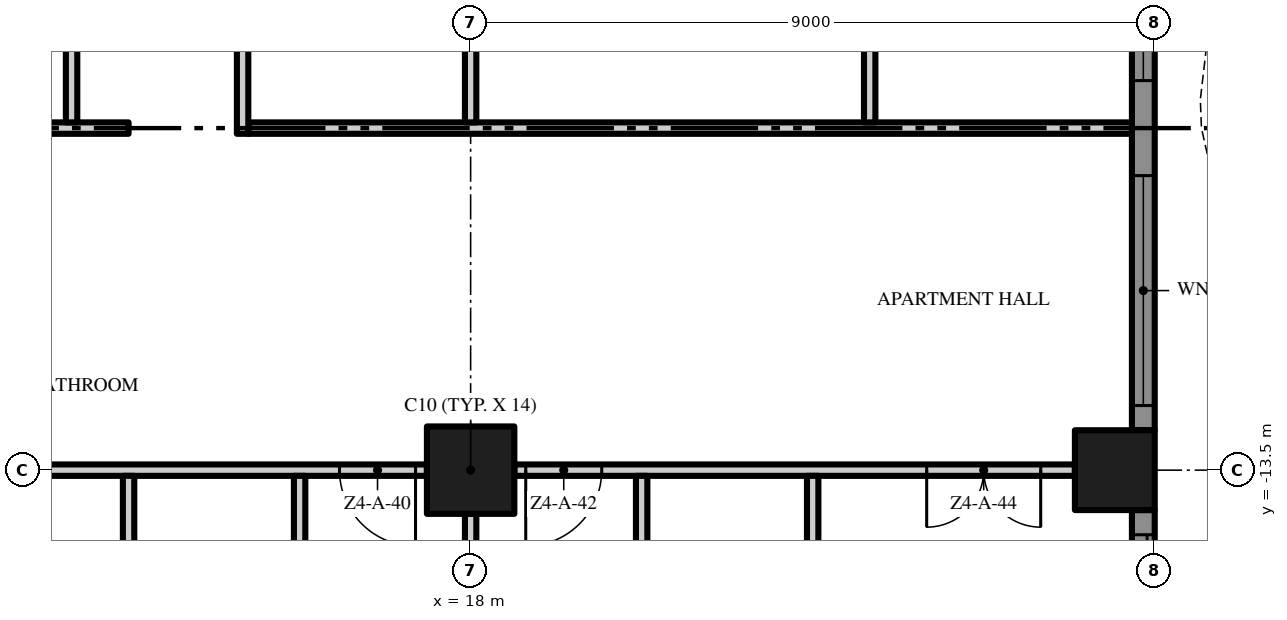
"""IFC4 building model, lengths in metres.
Left out: names, types, materials, properties, quantities, classifications, styles, units other than length and angle.
Written with IfcOpenShell. Run it as: python <this file> out.ifc"""

import sys

from ifc_helpers import new_model, si_unit, direction, frame, frame_2d, origin, origin_2d, place, context, subcontext, project, spatial, polyline, rectangle, outline, extrude, element, fill, save


model = new_model("IFC4")
c1 = context("Model", 3, precision=1e-05, world=origin(), true_north=direction((0.0, 1.0)))
c2 = subcontext(c1, "Body", "Model", "MODEL_VIEW")
j1 = project(units=[si_unit("LENGTHUNIT", "METRE"), si_unit("PLANEANGLEUNIT", "RADIAN")], contexts=[c1])
p1 = place(None, origin())
s1 = spatial("IfcSite", under=j1, at=p1, CompositionType="ELEMENT")
p2 = place(p1, origin())
s2 = spatial("IfcBuilding", under=s1, at=p2, CompositionType="ELEMENT")
p3 = place(p2, frame((0.0, 0.0, 184.4)))
s3 = spatial("IfcBuildingStorey", under=s2, at=p3, CompositionType="ELEMENT", Elevation=184.4)
p4 = place(p3, frame((18.0, -13.5, 0.0), z_axis=(0.0, 0.0, 1.0), x_axis=(1.0, 0.0, 0.0)))
e1 = element("IfcColumn", 1, at=p4, inside=s3, PredefinedType="COLUMN", context=c2, shape_type="SweptSolid", body=[
    extrude(rectangle(XDim=1.15, YDim=1.15, at=origin_2d()), origin(), (0.0, 0.0, 1.0), 3.5),
])
p5 = place(p3, frame((26.475, -13.5, 0.0), z_axis=(0.0, 0.0, 1.0), x_axis=(1.0, 0.0, 0.0)))
e2 = element("IfcColumn", 2, at=p5, inside=s3, PredefinedType="COLUMN", context=c2, shape_type="SweptSolid", body=[
    extrude(rectangle(XDim=1.05, YDim=1.05, at=origin_2d()), origin(), (0.0, 0.0, 1.0), 3.5),
])
p6 = place(p3, frame((26.85, -14.025, 0.0), z_axis=(0.0, 0.0, 1.0), x_axis=(0.0, -1.0, 0.0)))
e3 = element("IfcWall", 3, at=p6, inside=s3, PredefinedType="SOLIDWALL", context=c2, shape_type="SweptSolid", body=[
    extrude(rectangle(XDim=3.675, YDim=0.3, at=frame_2d((1.837, 0.0))), origin(), (0.0, 0.0, 1.0), 3.5),
])
p7 = place(p6, frame((0.325, 0.0, 0.0)))
e4 = element("IfcOpeningElement", 4, at=p7, cuts=e3, PredefinedType="OPENING", context=c2, shape_type="SweptSolid", body=[
    extrude(rectangle(XDim=3.025, YDim=2.4, at=frame_2d((1.512, 1.2))), frame((0.0, 0.16, 0.0), z_axis=(0.0, -1.0, 0.0), x_axis=(1.0, 0.0, 0.0)), (0.0, 0.0, 1.0), 0.32),
])
p8 = place(p3, frame((26.85, -5.025, 0.0), z_axis=(0.0, 0.0, 1.0), x_axis=(0.0, -1.0, 0.0)))
e5 = element("IfcWall", 5, at=p8, inside=s3, PredefinedType="SOLIDWALL", context=c2, shape_type="SweptSolid", body=[
    extrude(rectangle(XDim=7.95, YDim=0.3, at=frame_2d((3.975, 0.0))), origin(), (0.0, 0.0, 1.0), 3.5),
])
p9 = place(p8, frame((4.6, 0.0, 0.45)))
e6 = element("IfcOpeningElement", 6, at=p9, cuts=e5, PredefinedType="OPENING", context=c2, shape_type="SweptSolid", body=[
    extrude(rectangle(XDim=3.025, YDim=2.65, at=frame_2d((1.512, 1.325))), frame((0.0, 0.16, 0.0), z_axis=(0.0, -1.0, 0.0), x_axis=(1.0, 0.0, 0.0)), (0.0, 0.0, 1.0), 0.32),
])
p10 = place(p8, frame((0.325, 0.0, 0.45)))
e7 = element("IfcOpeningElement", 7, at=p10, cuts=e5, PredefinedType="OPENING", context=c2, shape_type="SweptSolid", body=[
    extrude(rectangle(XDim=3.025, YDim=2.65, at=frame_2d((1.512, 1.325))), frame((0.0, 0.16, 0.0), z_axis=(0.0, -1.0, 0.0), x_axis=(1.0, 0.0, 0.0)), (0.0, 0.0, 1.0), 0.32),
])
p11 = place(p3, origin())
e8 = element("IfcWall", 8, at=p11, inside=s3, PredefinedType="USERDEFINED", context=c2, shape_type="SweptSolid", body=[
    extrude(outline(polyline([(29.649, -18.0), (29.985, -16.5), (30.0, -16.125), (29.869, -15.0), (29.345, -13.5), (28.612, -12.0), (27.951, -10.5), (27.615, -9.0), (27.6, -8.625), (27.731, -7.5), (28.255, -6.0), (28.988, -4.5), (29.649, -3.0), (29.985, -1.5), (30.0, -1.125), (29.869, 0.0), (29.345, 1.5), (28.612, 3.0), (27.951, 4.5), (27.615, 6.0), (27.6, 6.375), (27.731, 7.5), (28.255, 9.0), (28.988, 10.5), (29.649, 12.0), (29.985, 13.5), (30.0, 13.875), (29.869, 15.0), (29.345, 16.5), (28.612, 18.0), (28.388, 17.89), (29.114, 16.404), (29.624, 14.944), (29.749, 13.865), (29.736, 13.533), (29.41, 12.079), (28.761, 10.605), (28.024, 9.096), (27.486, 7.556), (27.349, 6.385), (27.366, 5.967), (27.713, 4.421), (28.385, 2.895), (29.114, 1.404), (29.624, -0.056), (29.749, -1.135), (29.736, -1.467), (29.41, -2.921), (28.761, -4.395), (28.024, -5.904), (27.486, -7.444), (27.349, -8.615), (27.366, -9.033), (27.713, -10.579), (28.385, -12.105), (29.114, -13.596), (29.624, -15.056), (29.749, -16.135), (29.736, -16.467), (29.405, -17.945), (29.649, -18.0)])), origin(), (0.0, 0.0, 1.0), 0.9),
])
p12 = place(p3, frame((17.425, -13.5, 0.0), z_axis=(0.0, 0.0, 1.0), x_axis=(-1.0, 0.0, 0.0)))
e9 = element("IfcWall", 9, at=p12, inside=s3, PredefinedType="PARTITIONING", context=c2, shape_type="SweptSolid", body=[
    extrude(rectangle(XDim=7.85, YDim=0.15, at=frame_2d((3.925, 0.0))), origin(), (0.0, 0.0, 1.0), 3.5),
])
p13 = place(p12, frame((6.7, 0.0, 0.0)))
e10 = element("IfcOpeningElement", 10, at=p13, cuts=e9, PredefinedType="OPENING", context=c2, shape_type="SweptSolid", body=[
    extrude(rectangle(XDim=1.0, YDim=2.4, at=frame_2d((0.5, 1.2))), frame((0.0, 0.085, 0.0), z_axis=(0.0, -1.0, 0.0), x_axis=(1.0, 0.0, 0.0)), (0.0, 0.0, 1.0), 0.17),
])
p14 = place(p12, frame((0.15, 0.0, 0.0)))
e11 = element("IfcOpeningElement", 11, at=p14, cuts=e9, PredefinedType="OPENING", context=c2, shape_type="SweptSolid", body=[
    extrude(rectangle(XDim=1.0, YDim=2.4, at=frame_2d((0.5, 1.2))), frame((0.0, 0.085, 0.0), z_axis=(0.0, -1.0, 0.0), x_axis=(1.0, 0.0, 0.0)), (0.0, 0.0, 1.0), 0.17),
])
p15 = place(p3, frame((25.95, -13.5, 0.0), z_axis=(0.0, 0.0, 1.0), x_axis=(-1.0, 0.0, 0.0)))
e12 = element("IfcWall", 12, at=p15, inside=s3, PredefinedType="PARTITIONING", context=c2, shape_type="SweptSolid", body=[
    extrude(rectangle(XDim=7.375, YDim=0.15, at=frame_2d((3.688, 0.0))), origin(), (0.0, 0.0, 1.0), 3.5),
])
p16 = place(p15, frame((6.225, 0.0, 0.0)))
e13 = element("IfcOpeningElement", 13, at=p16, cuts=e12, PredefinedType="OPENING", context=c2, shape_type="SweptSolid", body=[
    extrude(rectangle(XDim=1.0, YDim=2.4, at=frame_2d((0.5, 1.2))), frame((0.0, 0.085, 0.0), z_axis=(0.0, -1.0, 0.0), x_axis=(1.0, 0.0, 0.0)), (0.0, 0.0, 1.0), 0.17),
])
p17 = place(p15, frame((0.45, 0.0, 0.0)))
e14 = element("IfcOpeningElement", 14, at=p17, cuts=e12, PredefinedType="OPENING", context=c2, shape_type="SweptSolid", body=[
    extrude(rectangle(XDim=1.5, YDim=2.4, at=frame_2d((0.75, 1.2))), frame((0.0, 0.085, 0.0), z_axis=(0.0, -1.0, 0.0), x_axis=(1.0, 0.0, 0.0)), (0.0, 0.0, 1.0), 0.17),
])
p18 = place(p3, frame((0.1, -9.0, 0.0), z_axis=(0.0, 0.0, 1.0), x_axis=(1.0, 0.0, 0.0)))
e15 = element("IfcWall", 15, at=p18, inside=s3, PredefinedType="PARTITIONING", context=c2, shape_type="SweptSolid", body=[
    extrude(rectangle(XDim=13.4, YDim=0.15, at=frame_2d((6.7, 0.0))), origin(), (0.0, 0.0, 1.0), 3.5),
])
p19 = place(p18, frame((6.9, 0.0, 0.0)))
e16 = element("IfcOpeningElement", 16, at=p19, cuts=e15, PredefinedType="OPENING", context=c2, shape_type="SweptSolid", body=[
    extrude(rectangle(XDim=1.0, YDim=2.4, at=frame_2d((0.5, 1.2))), frame((0.0, 0.085, 0.0), z_axis=(0.0, -1.0, 0.0), x_axis=(1.0, 0.0, 0.0)), (0.0, 0.0, 1.0), 0.17),
])
p20 = place(p3, frame((15.075, -9.0, 0.0), z_axis=(0.0, 0.0, 1.0), x_axis=(1.0, 0.0, 0.0)))
e17 = element("IfcWall", 17, at=p20, inside=s3, PredefinedType="PARTITIONING", context=c2, shape_type="SweptSolid", body=[
    extrude(rectangle(XDim=11.625, YDim=0.15, at=frame_2d((5.812, 0.0))), origin(), (0.0, 0.0, 1.0), 3.5),
])
p21 = place(p3, frame((12.75, -8.925, 0.0), z_axis=(0.0, 0.0, 1.0), x_axis=(0.0, 1.0, 0.0)))
e18 = element("IfcWall", 18, at=p21, inside=s3, PredefinedType="PARTITIONING", context=c2, shape_type="SweptSolid", body=[
    extrude(rectangle(XDim=4.5, YDim=0.15, at=frame_2d((2.25, 0.0))), origin(), (0.0, 0.0, 1.0), 3.5),
])
p22 = place(p21, frame((1.75, 0.0, 0.0)))
e19 = element("IfcOpeningElement", 19, at=p22, cuts=e18, PredefinedType="OPENING", context=c2, shape_type="SweptSolid", body=[
    extrude(rectangle(XDim=0.9, YDim=2.1, at=frame_2d((0.45, 1.05))), frame((0.0, 0.085, 0.0), z_axis=(0.0, -1.0, 0.0), x_axis=(1.0, 0.0, 0.0)), (0.0, 0.0, 1.0), 0.17),
])
p23 = place(p3, frame((13.5, -22.2, 0.0), z_axis=(0.0, 0.0, 1.0), x_axis=(0.0, 1.0, 0.0)))
e20 = element("IfcWall", 20, at=p23, inside=s3, PredefinedType="PARTITIONING", context=c2, shape_type="SweptSolid", body=[
    extrude(rectangle(XDim=8.625, YDim=0.15, at=frame_2d((4.312, 0.0))), origin(), (0.0, 0.0, 1.0), 3.5),
])
p24 = place(p3, frame((15.0, -9.075, 0.0), z_axis=(0.0, 0.0, 1.0), x_axis=(0.0, 1.0, 0.0)))
e21 = element("IfcWall", 21, at=p24, inside=s3, PredefinedType="PARTITIONING", context=c2, shape_type="SweptSolid", body=[
    extrude(rectangle(XDim=4.65, YDim=0.15, at=frame_2d((2.325, 0.0))), origin(), (0.0, 0.0, 1.0), 3.5),
])
p25 = place(p3, frame((15.75, -16.575, 0.0), z_axis=(0.0, 0.0, 1.0), x_axis=(0.0, 1.0, 0.0)))
e22 = element("IfcWall", 22, at=p25, inside=s3, PredefinedType="PARTITIONING", context=c2, shape_type="SweptSolid", body=[
    extrude(rectangle(XDim=3.0, YDim=0.15, at=frame_2d((1.5, 0.0))), origin(), (0.0, 0.0, 1.0), 3.5),
])
p26 = place(p3, frame((18.0, -21.45, 0.0), z_axis=(0.0, 0.0, 1.0), x_axis=(0.0, 1.0, 0.0)))
e23 = element("IfcWall", 23, at=p26, inside=s3, PredefinedType="PARTITIONING", context=c2, shape_type="SweptSolid", body=[
    extrude(rectangle(XDim=7.375, YDim=0.15, at=frame_2d((3.688, 0.0))), origin(), (0.0, 0.0, 1.0), 3.5),
])
p27 = place(p3, frame((18.0, -8.925, 0.0), z_axis=(0.0, 0.0, 1.0), x_axis=(0.0, 1.0, 0.0)))
e24 = element("IfcWall", 24, at=p27, inside=s3, PredefinedType="PARTITIONING", context=c2, shape_type="SweptSolid", body=[
    extrude(rectangle(XDim=3.85, YDim=0.15, at=frame_2d((1.925, 0.0))), origin(), (0.0, 0.0, 1.0), 3.5),
])
p28 = place(p3, frame((20.25, -16.575, 0.0), z_axis=(0.0, 0.0, 1.0), x_axis=(0.0, 1.0, 0.0)))
e25 = element("IfcWall", 25, at=p28, inside=s3, PredefinedType="PARTITIONING", context=c2, shape_type="SweptSolid", body=[
    extrude(rectangle(XDim=3.0, YDim=0.15, at=frame_2d((1.5, 0.0))), origin(), (0.0, 0.0, 1.0), 3.5),
])
p29 = place(p3, frame((22.5, -17.475, 0.0), z_axis=(0.0, 0.0, 1.0), x_axis=(0.0, 1.0, 0.0)))
e26 = element("IfcWall", 26, at=p29, inside=s3, PredefinedType="PARTITIONING", context=c2, shape_type="SweptSolid", body=[
    extrude(rectangle(XDim=3.9, YDim=0.15, at=frame_2d((1.95, 0.0))), origin(), (0.0, 0.0, 1.0), 3.5),
])
p30 = place(p3, frame((23.25, -4.575, 0.0), z_axis=(0.0, 0.0, 1.0), x_axis=(0.0, -1.0, 0.0)))
e27 = element("IfcWall", 27, at=p30, inside=s3, PredefinedType="PARTITIONING", context=c2, shape_type="SweptSolid", body=[
    extrude(rectangle(XDim=4.35, YDim=0.15, at=frame_2d((2.175, 0.0))), origin(), (0.0, 0.0, 1.0), 3.5),
])
p31 = place(p30, frame((1.7, 0.0, 0.0)))
e28 = element("IfcOpeningElement", 28, at=p31, cuts=e27, PredefinedType="OPENING", context=c2, shape_type="SweptSolid", body=[
    extrude(rectangle(XDim=0.9, YDim=2.1, at=frame_2d((0.45, 1.05))), frame((0.0, 0.085, 0.0), z_axis=(0.0, -1.0, 0.0), x_axis=(1.0, 0.0, 0.0)), (0.0, 0.0, 1.0), 0.17),
])
p32 = place(p7, origin())
e29 = element("IfcDoor", 29, at=p32, inside=s3, OperationType="SINGLE_SWING_LEFT", PredefinedType="DOOR", context=c2, shape_type="SweptSolid", body=[
    extrude(rectangle(XDim=3.025, YDim=2.4, at=frame_2d((1.512, 1.2))), frame((0.0, 0.025, 0.0), z_axis=(0.0, -1.0, 0.0), x_axis=(1.0, 0.0, 0.0)), (0.0, 0.0, 1.0), 0.05),
])
fill(e4, e29)
p33 = place(p9, origin())
e30 = element("IfcWindow", 30, at=p33, inside=s3, PartitioningType="SINGLE_PANEL", PredefinedType="WINDOW", context=c2, shape_type="SweptSolid", body=[
    extrude(rectangle(XDim=3.025, YDim=2.65, at=frame_2d((1.512, 1.325))), frame((0.0, 0.03, 0.0), z_axis=(0.0, -1.0, 0.0), x_axis=(1.0, 0.0, 0.0)), (0.0, 0.0, 1.0), 0.06),
])
fill(e6, e30)
p34 = place(p10, origin())
e31 = element("IfcWindow", 31, at=p34, inside=s3, PartitioningType="SINGLE_PANEL", PredefinedType="WINDOW", context=c2, shape_type="SweptSolid", body=[
    extrude(rectangle(XDim=3.025, YDim=2.65, at=frame_2d((1.512, 1.325))), frame((0.0, 0.03, 0.0), z_axis=(0.0, -1.0, 0.0), x_axis=(1.0, 0.0, 0.0)), (0.0, 0.0, 1.0), 0.06),
])
fill(e7, e31)
p35 = place(p14, origin())
e32 = element("IfcDoor", 32, at=p35, inside=s3, OperationType="SINGLE_SWING_LEFT", PredefinedType="DOOR", context=c2, shape_type="SweptSolid", body=[
    extrude(rectangle(XDim=1.0, YDim=2.4, at=frame_2d((0.5, 1.2))), frame((0.0, 0.025, 0.0), z_axis=(0.0, -1.0, 0.0), x_axis=(1.0, 0.0, 0.0)), (0.0, 0.0, 1.0), 0.05),
])
fill(e11, e32)
p36 = place(p16, origin())
e33 = element("IfcDoor", 33, at=p36, inside=s3, OperationType="SINGLE_SWING_RIGHT", PredefinedType="DOOR", context=c2, shape_type="SweptSolid", body=[
    extrude(rectangle(XDim=1.0, YDim=2.4, at=frame_2d((0.5, 1.2))), frame((0.0, 0.025, 0.0), z_axis=(0.0, -1.0, 0.0), x_axis=(1.0, 0.0, 0.0)), (0.0, 0.0, 1.0), 0.05),
])
fill(e13, e33)
p37 = place(p17, origin())
e34 = element("IfcDoor", 34, at=p37, inside=s3, OperationType="DOUBLE_DOOR_SINGLE_SWING", PredefinedType="DOOR", context=c2, shape_type="SweptSolid", body=[
    extrude(rectangle(XDim=1.5, YDim=2.4, at=frame_2d((0.75, 1.2))), frame((0.0, 0.025, 0.0), z_axis=(0.0, -1.0, 0.0), x_axis=(1.0, 0.0, 0.0)), (0.0, 0.0, 1.0), 0.05),
])
fill(e14, e34)
save(model, sys.argv[1])
